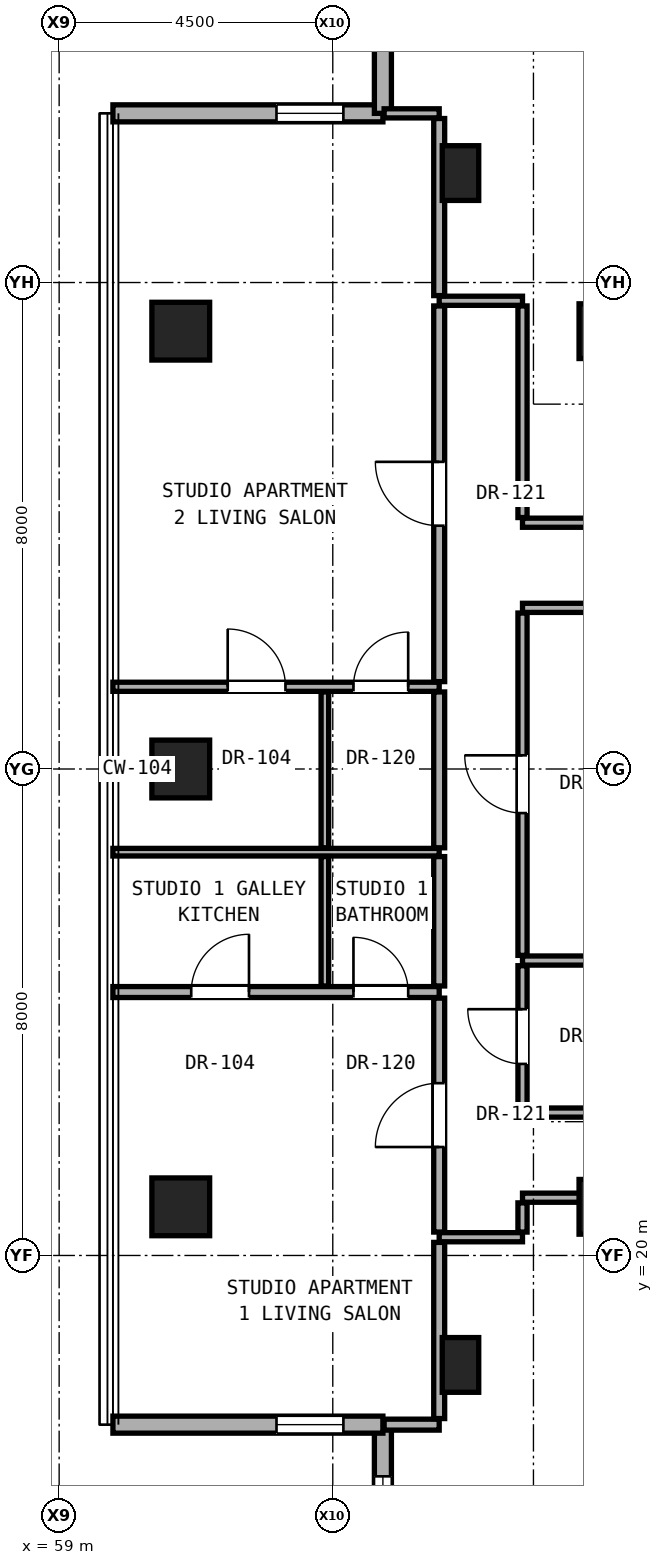
"""IFC4 building model, lengths in metres.
Left out: names, types, materials, properties, quantities, classifications, styles, units other than length and angle.
Written with IfcOpenShell. Run it as: python <this file> out.ifc"""

import sys

from ifc_helpers import new_model, si_unit, direction, frame, frame_2d, origin, origin_2d, place, context, subcontext, project, spatial, rectangle, hollow_rectangle, extrude, element, fill, save


model = new_model("IFC4")
c1 = context("Model", 3, precision=1e-05, world=origin(), true_north=direction((0.0, 1.0)))
c2 = subcontext(c1, "Body", "Model", "MODEL_VIEW")
j1 = project(units=[si_unit("LENGTHUNIT", "METRE"), si_unit("PLANEANGLEUNIT", "RADIAN")], contexts=[c1])
p1 = place(None, origin())
s1 = spatial("IfcSite", under=j1, at=p1, CompositionType="ELEMENT")
p2 = place(p1, origin())
s2 = spatial("IfcBuilding", under=s1, at=p2, CompositionType="ELEMENT")
p3 = place(p2, frame((0.0, 0.0, 186.9)))
s3 = spatial("IfcBuildingStorey", under=s2, at=p3, CompositionType="ELEMENT", Elevation=186.9)
for number, where, z_axis, x_axis in (
    (1, (68.0, 20.8, 0.0), (0.0, 0.0, 1.0), (1.0, 0.0, 0.0)),
    (2, (68.0, 35.2, 0.0), (0.0, 0.0, 1.0), (1.0, 0.0, 0.0)),
):
    element("IfcColumn", number, at=place(p3, frame(where, z_axis=z_axis, x_axis=x_axis)), inside=s3, PredefinedType="COLUMN", context=c2, shape_type="SweptSolid", body=[
        extrude(rectangle(XDim=0.9, YDim=0.9, at=origin_2d()), origin(), (0.0, 0.0, 1.0), 3.25),
    ])
for number, where, z_axis, x_axis in (
    (3, (61.0, 20.8, 0.0), (0.0, 0.0, 1.0), (1.0, 0.0, 0.0)),
    (4, (61.0, 28.0, 0.0), (0.0, 0.0, 1.0), (1.0, 0.0, 0.0)),
    (5, (61.0, 35.2, 0.0), (0.0, 0.0, 1.0), (1.0, 0.0, 0.0)),
):
    element("IfcColumn", number, at=place(p3, frame(where, z_axis=z_axis, x_axis=x_axis)), inside=s3, PredefinedType="COLUMN", context=c2, shape_type="SweptSolid", body=[
        extrude(hollow_rectangle(XDim=0.95, YDim=0.95, WallThickness=0.05, at=origin_2d()), origin(), (0.0, 0.0, 1.0), 3.25),
    ])
for number, where, z_axis, x_axis in (
    (6, (65.6, 18.2, 0.0), (0.0, 0.0, 1.0), (1.0, 0.0, 0.0)),
    (7, (65.6, 37.8, 0.0), (0.0, 0.0, 1.0), (1.0, 0.0, 0.0)),
):
    element("IfcColumn", number, at=place(p3, frame(where, z_axis=z_axis, x_axis=x_axis)), inside=s3, PredefinedType="PILASTER", context=c2, shape_type="SweptSolid", body=[
        extrude(rectangle(XDim=0.6, YDim=0.9, at=origin_2d()), origin(), (0.0, 0.0, 1.0), 3.25),
    ])
p4 = place(p3, frame((64.324, 17.218, 0.0), z_axis=(0.0, 0.0, 1.0), x_axis=(0.0, -1.0, 0.0)))
e8 = element("IfcWall", 8, at=p4, inside=s3, PredefinedType="SOLIDWALL", context=c2, shape_type="SweptSolid", body=[
    extrude(rectangle(XDim=4.44, YDim=0.28, at=frame_2d((2.22, 0.0))), origin(), (0.0, 0.0, 1.0), 3.03),
])
p5 = place(p4, frame((0.85, 0.0, 0.68)))
e9 = element("IfcOpeningElement", 9, at=p5, cuts=e8, PredefinedType="OPENING", context=c2, shape_type="SweptSolid", body=[
    extrude(rectangle(XDim=1.65, YDim=2.2, at=frame_2d((0.825, 1.1))), frame((0.0, 0.15, 0.0), z_axis=(0.0, -1.0, 0.0), x_axis=(1.0, 0.0, 0.0)), (0.0, 0.0, 1.0), 0.3),
])
p6 = place(p3, frame((59.885, 17.218, 0.0), z_axis=(0.0, 0.0, 1.0), x_axis=(1.0, 0.0, 0.0)))
e10 = element("IfcWall", 10, at=p6, inside=s3, PredefinedType="SOLIDWALL", context=c2, shape_type="SweptSolid", body=[
    extrude(rectangle(XDim=4.44, YDim=0.28, at=frame_2d((2.22, 0.0))), origin(), (0.0, 0.0, 1.0), 3.03),
])
p7 = place(p6, frame((2.69, 0.0, 0.85)))
e11 = element("IfcOpeningElement", 11, at=p7, cuts=e10, PredefinedType="OPENING", context=c2, shape_type="SweptSolid", body=[
    extrude(rectangle(XDim=1.1, YDim=2.0, at=frame_2d((0.55, 1.0))), frame((0.0, 0.15, 0.0), z_axis=(0.0, -1.0, 0.0), x_axis=(1.0, 0.0, 0.0)), (0.0, 0.0, 1.0), 0.3),
])
p8 = place(p3, frame((64.324, 38.782, 0.0), z_axis=(0.0, 0.0, 1.0), x_axis=(-1.0, 0.0, 0.0)))
e12 = element("IfcWall", 12, at=p8, inside=s3, PredefinedType="SOLIDWALL", context=c2, shape_type="SweptSolid", body=[
    extrude(rectangle(XDim=4.44, YDim=0.28, at=frame_2d((2.22, 0.0))), origin(), (0.0, 0.0, 1.0), 3.03),
])
p9 = place(p8, frame((0.65, 0.0, 0.85)))
e13 = element("IfcOpeningElement", 13, at=p9, cuts=e12, PredefinedType="OPENING", context=c2, shape_type="SweptSolid", body=[
    extrude(rectangle(XDim=1.1, YDim=2.0, at=frame_2d((0.55, 1.0))), frame((0.0, 0.15, 0.0), z_axis=(0.0, -1.0, 0.0), x_axis=(1.0, 0.0, 0.0)), (0.0, 0.0, 1.0), 0.3),
])
p10 = place(p3, frame((64.324, 43.222, 0.0), z_axis=(0.0, 0.0, 1.0), x_axis=(0.0, -1.0, 0.0)))
e14 = element("IfcWall", 14, at=p10, inside=s3, PredefinedType="SOLIDWALL", context=c2, shape_type="SweptSolid", body=[
    extrude(rectangle(XDim=4.44, YDim=0.28, at=frame_2d((2.22, 0.0))), origin(), (0.0, 0.0, 1.0), 3.03),
])
p11 = place(p3, frame((64.344, 17.218, 0.0), z_axis=(0.0, 0.0, 1.0), x_axis=(1.0, 0.0, 0.0)))
e15 = element("IfcWall", 15, at=p11, inside=s3, PredefinedType="PARTITIONING", context=c2, shape_type="SweptSolid", body=[
    extrude(rectangle(XDim=0.906, YDim=0.18, at=frame_2d((0.453, 0.0))), origin(), (0.0, 0.0, 1.0), 3.05),
])
p12 = place(p3, frame((65.25, 20.3, 0.0), z_axis=(0.0, 0.0, 1.0), x_axis=(1.0, 0.0, 0.0)))
e16 = element("IfcWall", 16, at=p12, inside=s3, PredefinedType="PARTITIONING", context=c2, shape_type="SweptSolid", body=[
    extrude(rectangle(XDim=1.37, YDim=0.15, at=frame_2d((0.685, 0.0))), origin(), (0.0, 0.0, 1.0), 3.05),
])
p13 = place(p3, frame((66.62, 20.95, 0.0), z_axis=(0.0, 0.0, 1.0), x_axis=(1.0, 0.0, 0.0)))
e17 = element("IfcWall", 17, at=p13, inside=s3, PredefinedType="PARTITIONING", context=c2, shape_type="SweptSolid", body=[
    extrude(rectangle(XDim=1.11, YDim=0.15, at=frame_2d((0.555, 0.0))), origin(), (0.0, 0.0, 1.0), 2.442),
])
p14 = place(p3, frame((66.62, 22.35, 0.0), z_axis=(0.0, 0.0, 1.0), x_axis=(1.0, 0.0, 0.0)))
e18 = element("IfcWall", 18, at=p14, inside=s3, PredefinedType="PARTITIONING", context=c2, shape_type="SweptSolid", body=[
    extrude(rectangle(XDim=10.14, YDim=0.15, at=frame_2d((5.07, 0.0))), origin(), (0.0, 0.0, 1.0), 2.186),
])
p15 = place(p3, frame((59.884, 24.332, 0.0), z_axis=(0.0, 0.0, 1.0), x_axis=(1.0, 0.0, 0.0)))
e19 = element("IfcWall", 19, at=p15, inside=s3, PredefinedType="PARTITIONING", context=c2, shape_type="SweptSolid", body=[
    extrude(rectangle(XDim=5.366, YDim=0.18, at=frame_2d((2.683, 0.0))), origin(), (0.0, 0.0, 1.0), 2.269),
])
p16 = place(p15, frame((1.288, 0.0, 0.0)))
e20 = element("IfcOpeningElement", 20, at=p16, cuts=e19, PredefinedType="OPENING", context=c2, shape_type="SweptSolid", body=[
    extrude(rectangle(XDim=0.95, YDim=2.15, at=frame_2d((0.475, 1.075))), frame((0.0, 0.1, 0.0), z_axis=(0.0, -1.0, 0.0), x_axis=(1.0, 0.0, 0.0)), (0.0, 0.0, 1.0), 0.2),
])
p17 = place(p15, frame((3.956, 0.0, 0.0)))
e21 = element("IfcOpeningElement", 21, at=p17, cuts=e19, PredefinedType="OPENING", context=c2, shape_type="SweptSolid", body=[
    extrude(rectangle(XDim=0.9, YDim=2.1, at=frame_2d((0.45, 1.05))), frame((0.0, 0.1, 0.0), z_axis=(0.0, -1.0, 0.0), x_axis=(1.0, 0.0, 0.0)), (0.0, 0.0, 1.0), 0.2),
])
p18 = place(p3, frame((66.62, 24.85, 0.0), z_axis=(0.0, 0.0, 1.0), x_axis=(1.0, 0.0, 0.0)))
e22 = element("IfcWall", 22, at=p18, inside=s3, PredefinedType="PARTITIONING", context=c2, shape_type="SweptSolid", body=[
    extrude(rectangle(XDim=3.13, YDim=0.15, at=frame_2d((1.565, 0.0))), origin(), (0.0, 0.0, 1.0), 2.186),
])
p19 = place(p3, frame((59.884, 26.632, 0.0), z_axis=(0.0, 0.0, 1.0), x_axis=(1.0, 0.0, 0.0)))
e23 = element("IfcWall", 23, at=p19, inside=s3, PredefinedType="PARTITIONING", context=c2, shape_type="SweptSolid", body=[
    extrude(rectangle(XDim=5.366, YDim=0.125, at=frame_2d((2.683, 0.0))), origin(), (0.0, 0.0, 1.0), 2.269),
])
p20 = place(p3, frame((59.884, 29.352, 0.0), z_axis=(0.0, 0.0, 1.0), x_axis=(1.0, 0.0, 0.0)))
e24 = element("IfcWall", 24, at=p20, inside=s3, PredefinedType="PARTITIONING", context=c2, shape_type="SweptSolid", body=[
    extrude(rectangle(XDim=5.366, YDim=0.15, at=frame_2d((2.683, 0.0))), origin(), (0.0, 0.0, 1.0), 2.269),
])
p21 = place(p20, frame((1.888, 0.0, 0.0)))
e25 = element("IfcOpeningElement", 25, at=p21, cuts=e24, PredefinedType="OPENING", context=c2, shape_type="SweptSolid", body=[
    extrude(rectangle(XDim=0.95, YDim=2.15, at=frame_2d((0.475, 1.075))), frame((0.0, 0.085, 0.0), z_axis=(0.0, -1.0, 0.0), x_axis=(1.0, 0.0, 0.0)), (0.0, 0.0, 1.0), 0.17),
])
p22 = place(p20, frame((3.956, 0.0, 0.0)))
e26 = element("IfcOpeningElement", 26, at=p22, cuts=e24, PredefinedType="OPENING", context=c2, shape_type="SweptSolid", body=[
    extrude(rectangle(XDim=0.9, YDim=2.1, at=frame_2d((0.45, 1.05))), frame((0.0, 0.085, 0.0), z_axis=(0.0, -1.0, 0.0), x_axis=(1.0, 0.0, 0.0)), (0.0, 0.0, 1.0), 0.17),
])
p23 = place(p3, frame((66.62, 30.65, 0.0), z_axis=(0.0, 0.0, 1.0), x_axis=(1.0, 0.0, 0.0)))
e27 = element("IfcWall", 27, at=p23, inside=s3, PredefinedType="PARTITIONING", context=c2, shape_type="SweptSolid", body=[
    extrude(rectangle(XDim=10.14, YDim=0.15, at=frame_2d((5.07, 0.0))), origin(), (0.0, 0.0, 1.0), 2.186),
])
p24 = place(p23, frame((6.14, 0.0, 0.0)))
e28 = element("IfcOpeningElement", 28, at=p24, cuts=e27, PredefinedType="OPENING", context=c2, shape_type="SweptSolid", body=[
    extrude(rectangle(XDim=0.95, YDim=2.15, at=frame_2d((0.475, 1.075))), frame((0.0, 0.085, 0.0), z_axis=(0.0, -1.0, 0.0), x_axis=(1.0, 0.0, 0.0)), (0.0, 0.0, 1.0), 0.17),
])
p25 = place(p3, frame((66.62, 32.05, 0.0), z_axis=(0.0, 0.0, 1.0), x_axis=(1.0, 0.0, 0.0)))
e29 = element("IfcWall", 29, at=p25, inside=s3, PredefinedType="PARTITIONING", context=c2, shape_type="SweptSolid", body=[
    extrude(rectangle(XDim=2.18, YDim=0.15, at=frame_2d((1.09, 0.0))), origin(), (0.0, 0.0, 1.0), 2.186),
])
p26 = place(p3, frame((65.25, 35.7, 0.0), z_axis=(0.0, 0.0, 1.0), x_axis=(1.0, 0.0, 0.0)))
e30 = element("IfcWall", 30, at=p26, inside=s3, PredefinedType="PARTITIONING", context=c2, shape_type="SweptSolid", body=[
    extrude(rectangle(XDim=1.37, YDim=0.15, at=frame_2d((0.685, 0.0))), origin(), (0.0, 0.0, 1.0), 3.05),
])
p27 = place(p3, frame((64.344, 38.782, 0.0), z_axis=(0.0, 0.0, 1.0), x_axis=(1.0, 0.0, 0.0)))
e31 = element("IfcWall", 31, at=p27, inside=s3, PredefinedType="PARTITIONING", context=c2, shape_type="SweptSolid", body=[
    extrude(rectangle(XDim=0.906, YDim=0.15, at=frame_2d((0.453, 0.0))), origin(), (0.0, 0.0, 1.0), 3.05),
])
p28 = place(p3, frame((63.37, 24.432, 0.0), z_axis=(0.0, 0.0, 1.0), x_axis=(0.0, 1.0, 0.0)))
e32 = element("IfcWall", 32, at=p28, inside=s3, PredefinedType="PARTITIONING", context=c2, shape_type="SweptSolid", body=[
    extrude(rectangle(XDim=2.128, YDim=0.125, at=frame_2d((1.064, 0.0))), origin(), (0.0, 0.0, 1.0), 3.05),
])
p29 = place(p3, frame((63.37, 26.705, 0.0), z_axis=(0.0, 0.0, 1.0), x_axis=(0.0, 1.0, 0.0)))
e33 = element("IfcWall", 33, at=p29, inside=s3, PredefinedType="PARTITIONING", context=c2, shape_type="SweptSolid", body=[
    extrude(rectangle(XDim=2.562, YDim=0.125, at=frame_2d((1.281, 0.0))), origin(), (0.0, 0.0, 1.0), 2.346),
])
p30 = place(p3, frame((65.25, 17.318, 0.0), z_axis=(0.0, 0.0, 1.0), x_axis=(0.0, 1.0, 0.0)))
e34 = element("IfcWall", 34, at=p30, inside=s3, PredefinedType="PARTITIONING", context=c2, shape_type="SweptSolid", body=[
    extrude(rectangle(XDim=2.897, YDim=0.18, at=frame_2d((1.448, 0.0))), origin(), (0.0, 0.0, 1.0), 2.493),
])
p31 = place(p3, frame((65.25, 20.385, 0.0), z_axis=(0.0, 0.0, 1.0), x_axis=(0.0, 1.0, 0.0)))
e35 = element("IfcWall", 35, at=p31, inside=s3, PredefinedType="PARTITIONING", context=c2, shape_type="SweptSolid", body=[
    extrude(rectangle(XDim=3.847, YDim=0.18, at=frame_2d((1.923, 0.0))), origin(), (0.0, 0.0, 1.0), 2.442),
])
p32 = place(p31, frame((1.398, 0.0, 0.0)))
e36 = element("IfcOpeningElement", 36, at=p32, cuts=e35, PredefinedType="OPENING", context=c2, shape_type="SweptSolid", body=[
    extrude(rectangle(XDim=1.05, YDim=2.2, at=frame_2d((0.525, 1.1))), frame((0.0, 0.1, 0.0), z_axis=(0.0, -1.0, 0.0), x_axis=(1.0, 0.0, 0.0)), (0.0, 0.0, 1.0), 0.2),
])
p33 = place(p3, frame((65.25, 24.432, 0.0), z_axis=(0.0, 0.0, 1.0), x_axis=(0.0, 1.0, 0.0)))
e37 = element("IfcWall", 37, at=p33, inside=s3, PredefinedType="PARTITIONING", context=c2, shape_type="SweptSolid", body=[
    extrude(rectangle(XDim=2.128, YDim=0.18, at=frame_2d((1.064, 0.0))), origin(), (0.0, 0.0, 1.0), 3.05),
])
p34 = place(p3, frame((65.25, 26.705, 0.0), z_axis=(0.0, 0.0, 1.0), x_axis=(0.0, 1.0, 0.0)))
e38 = element("IfcWall", 38, at=p34, inside=s3, PredefinedType="PARTITIONING", context=c2, shape_type="SweptSolid", body=[
    extrude(rectangle(XDim=2.562, YDim=0.18, at=frame_2d((1.281, 0.0))), origin(), (0.0, 0.0, 1.0), 2.346),
])
p35 = place(p3, frame((65.25, 29.437, 0.0), z_axis=(0.0, 0.0, 1.0), x_axis=(0.0, 1.0, 0.0)))
e39 = element("IfcWall", 39, at=p35, inside=s3, PredefinedType="PARTITIONING", context=c2, shape_type="SweptSolid", body=[
    extrude(rectangle(XDim=6.178, YDim=0.18, at=frame_2d((3.089, 0.0))), origin(), (0.0, 0.0, 1.0), 2.442),
])
p36 = place(p35, frame((2.564, 0.0, 0.0)))
e40 = element("IfcOpeningElement", 40, at=p36, cuts=e39, PredefinedType="OPENING", context=c2, shape_type="SweptSolid", body=[
    extrude(rectangle(XDim=1.05, YDim=2.2, at=frame_2d((0.525, 1.1))), frame((0.0, 0.1, 0.0), z_axis=(0.0, -1.0, 0.0), x_axis=(1.0, 0.0, 0.0)), (0.0, 0.0, 1.0), 0.2),
])
p37 = place(p3, frame((65.25, 35.785, 0.0), z_axis=(0.0, 0.0, 1.0), x_axis=(0.0, 1.0, 0.0)))
e41 = element("IfcWall", 41, at=p37, inside=s3, PredefinedType="PARTITIONING", context=c2, shape_type="SweptSolid", body=[
    extrude(rectangle(XDim=2.912, YDim=0.18, at=frame_2d((1.456, 0.0))), origin(), (0.0, 0.0, 1.0), 2.493),
])
p38 = place(p3, frame((66.62, 20.385, 0.0), z_axis=(0.0, 0.0, 1.0), x_axis=(0.0, 1.0, 0.0)))
e42 = element("IfcWall", 42, at=p38, inside=s3, PredefinedType="PARTITIONING", context=c2, shape_type="SweptSolid", body=[
    extrude(rectangle(XDim=0.48, YDim=0.15, at=frame_2d((0.24, 0.0))), origin(), (0.0, 0.0, 1.0), 2.442),
])
p39 = place(p3, frame((66.62, 22.435, 0.0), z_axis=(0.0, 0.0, 1.0), x_axis=(0.0, 1.0, 0.0)))
e43 = element("IfcWall", 43, at=p39, inside=s3, PredefinedType="PARTITIONING", context=c2, shape_type="SweptSolid", body=[
    extrude(rectangle(XDim=2.33, YDim=0.15, at=frame_2d((1.165, 0.0))), origin(), (0.0, 0.0, 1.0), 3.05),
])
p40 = place(p39, frame((0.715, 0.0, 0.0)))
e44 = element("IfcOpeningElement", 44, at=p40, cuts=e43, PredefinedType="OPENING", context=c2, shape_type="SweptSolid", body=[
    extrude(rectangle(XDim=0.9, YDim=2.1, at=frame_2d((0.45, 1.05))), frame((0.0, 0.085, 0.0), z_axis=(0.0, -1.0, 0.0), x_axis=(1.0, 0.0, 0.0)), (0.0, 0.0, 1.0), 0.17),
])
p41 = place(p3, frame((66.62, 24.935, 0.0), z_axis=(0.0, 0.0, 1.0), x_axis=(0.0, 1.0, 0.0)))
e45 = element("IfcWall", 45, at=p41, inside=s3, PredefinedType="PARTITIONING", context=c2, shape_type="SweptSolid", body=[
    extrude(rectangle(XDim=5.63, YDim=0.15, at=frame_2d((2.815, 0.0))), origin(), (0.0, 0.0, 1.0), 2.346),
])
p42 = place(p41, frame((2.34, 0.0, 0.0)))
e46 = element("IfcOpeningElement", 46, at=p42, cuts=e45, PredefinedType="OPENING", context=c2, shape_type="SweptSolid", body=[
    extrude(rectangle(XDim=0.95, YDim=2.15, at=frame_2d((0.475, 1.075))), frame((0.0, 0.085, 0.0), z_axis=(0.0, -1.0, 0.0), x_axis=(1.0, 0.0, 0.0)), (0.0, 0.0, 1.0), 0.17),
])
p43 = place(p3, frame((66.62, 32.135, 0.0), z_axis=(0.0, 0.0, 1.0), x_axis=(0.0, 1.0, 0.0)))
e47 = element("IfcWall", 47, at=p43, inside=s3, PredefinedType="PARTITIONING", context=c2, shape_type="SweptSolid", body=[
    extrude(rectangle(XDim=3.48, YDim=0.15, at=frame_2d((1.74, 0.0))), origin(), (0.0, 0.0, 1.0), 2.442),
])
p44 = place(p5, origin())
e48 = element("IfcWindow", 48, at=p44, inside=s3, PartitioningType="SINGLE_PANEL", PredefinedType="WINDOW", context=c2, shape_type="SweptSolid", body=[
    extrude(rectangle(XDim=1.65, YDim=2.2, at=frame_2d((0.825, 1.1))), frame((0.0, 0.03, 0.0), z_axis=(0.0, -1.0, 0.0), x_axis=(1.0, 0.0, 0.0)), (0.0, 0.0, 1.0), 0.06),
])
fill(e9, e48)
p45 = place(p7, origin())
e49 = element("IfcWindow", 49, at=p45, inside=s3, PartitioningType="SINGLE_PANEL", PredefinedType="WINDOW", context=c2, shape_type="SweptSolid", body=[
    extrude(rectangle(XDim=1.1, YDim=2.0, at=frame_2d((0.55, 1.0))), frame((0.0, 0.03, 0.0), z_axis=(0.0, -1.0, 0.0), x_axis=(1.0, 0.0, 0.0)), (0.0, 0.0, 1.0), 0.06),
])
fill(e11, e49)
p46 = place(p9, origin())
e50 = element("IfcWindow", 50, at=p46, inside=s3, PartitioningType="SINGLE_PANEL", PredefinedType="WINDOW", context=c2, shape_type="SweptSolid", body=[
    extrude(rectangle(XDim=1.1, YDim=2.0, at=frame_2d((0.55, 1.0))), frame((0.0, 0.03, 0.0), z_axis=(0.0, -1.0, 0.0), x_axis=(1.0, 0.0, 0.0)), (0.0, 0.0, 1.0), 0.06),
])
fill(e13, e50)
p47 = place(p40, origin())
e51 = element("IfcDoor", 51, at=p47, inside=s3, OperationType="SINGLE_SWING_RIGHT", PredefinedType="DOOR", context=c2, shape_type="SweptSolid", body=[
    extrude(rectangle(XDim=0.9, YDim=2.1, at=frame_2d((0.45, 1.05))), frame((0.0, 0.025, 0.0), z_axis=(0.0, -1.0, 0.0), x_axis=(1.0, 0.0, 0.0)), (0.0, 0.0, 1.0), 0.05),
])
fill(e44, e51)
p48 = place(p32, origin())
e52 = element("IfcDoor", 52, at=p48, inside=s3, OperationType="SINGLE_SWING_LEFT", PredefinedType="DOOR", context=c2, shape_type="SweptSolid", body=[
    extrude(rectangle(XDim=1.05, YDim=2.2, at=frame_2d((0.525, 1.1))), frame((0.0, 0.025, 0.0), z_axis=(0.0, -1.0, 0.0), x_axis=(1.0, 0.0, 0.0)), (0.0, 0.0, 1.0), 0.05),
])
fill(e36, e52)
p49 = place(p16, origin())
e53 = element("IfcDoor", 53, at=p49, inside=s3, OperationType="SINGLE_SWING_RIGHT", PredefinedType="DOOR", context=c2, shape_type="SweptSolid", body=[
    extrude(rectangle(XDim=0.95, YDim=2.15, at=frame_2d((0.475, 1.075))), frame((0.0, 0.025, 0.0), z_axis=(0.0, -1.0, 0.0), x_axis=(1.0, 0.0, 0.0)), (0.0, 0.0, 1.0), 0.05),
])
fill(e20, e53)
p50 = place(p17, origin())
e54 = element("IfcDoor", 54, at=p50, inside=s3, OperationType="SINGLE_SWING_LEFT", PredefinedType="DOOR", context=c2, shape_type="SweptSolid", body=[
    extrude(rectangle(XDim=0.9, YDim=2.1, at=frame_2d((0.45, 1.05))), frame((0.0, 0.025, 0.0), z_axis=(0.0, -1.0, 0.0), x_axis=(1.0, 0.0, 0.0)), (0.0, 0.0, 1.0), 0.05),
])
fill(e21, e54)
p51 = place(p36, origin())
e55 = element("IfcDoor", 55, at=p51, inside=s3, OperationType="SINGLE_SWING_RIGHT", PredefinedType="DOOR", context=c2, shape_type="SweptSolid", body=[
    extrude(rectangle(XDim=1.05, YDim=2.2, at=frame_2d((0.525, 1.1))), frame((0.0, 0.025, 0.0), z_axis=(0.0, -1.0, 0.0), x_axis=(1.0, 0.0, 0.0)), (0.0, 0.0, 1.0), 0.05),
])
fill(e40, e55)
p52 = place(p21, origin())
e56 = element("IfcDoor", 56, at=p52, inside=s3, OperationType="SINGLE_SWING_LEFT", PredefinedType="DOOR", context=c2, shape_type="SweptSolid", body=[
    extrude(rectangle(XDim=0.95, YDim=2.15, at=frame_2d((0.475, 1.075))), frame((0.0, 0.025, 0.0), z_axis=(0.0, -1.0, 0.0), x_axis=(1.0, 0.0, 0.0)), (0.0, 0.0, 1.0), 0.05),
])
fill(e25, e56)
p53 = place(p22, origin())
e57 = element("IfcDoor", 57, at=p53, inside=s3, OperationType="SINGLE_SWING_RIGHT", PredefinedType="DOOR", context=c2, shape_type="SweptSolid", body=[
    extrude(rectangle(XDim=0.9, YDim=2.1, at=frame_2d((0.45, 1.05))), frame((0.0, 0.025, 0.0), z_axis=(0.0, -1.0, 0.0), x_axis=(1.0, 0.0, 0.0)), (0.0, 0.0, 1.0), 0.05),
])
fill(e26, e57)
p54 = place(p42, origin())
e58 = element("IfcDoor", 58, at=p54, inside=s3, OperationType="SINGLE_SWING_RIGHT", PredefinedType="DOOR", context=c2, shape_type="SweptSolid", body=[
    extrude(rectangle(XDim=0.95, YDim=2.15, at=frame_2d((0.475, 1.075))), frame((0.0, 0.025, 0.0), z_axis=(0.0, -1.0, 0.0), x_axis=(1.0, 0.0, 0.0)), (0.0, 0.0, 1.0), 0.05),
])
fill(e46, e58)
save(model, sys.argv[1])
